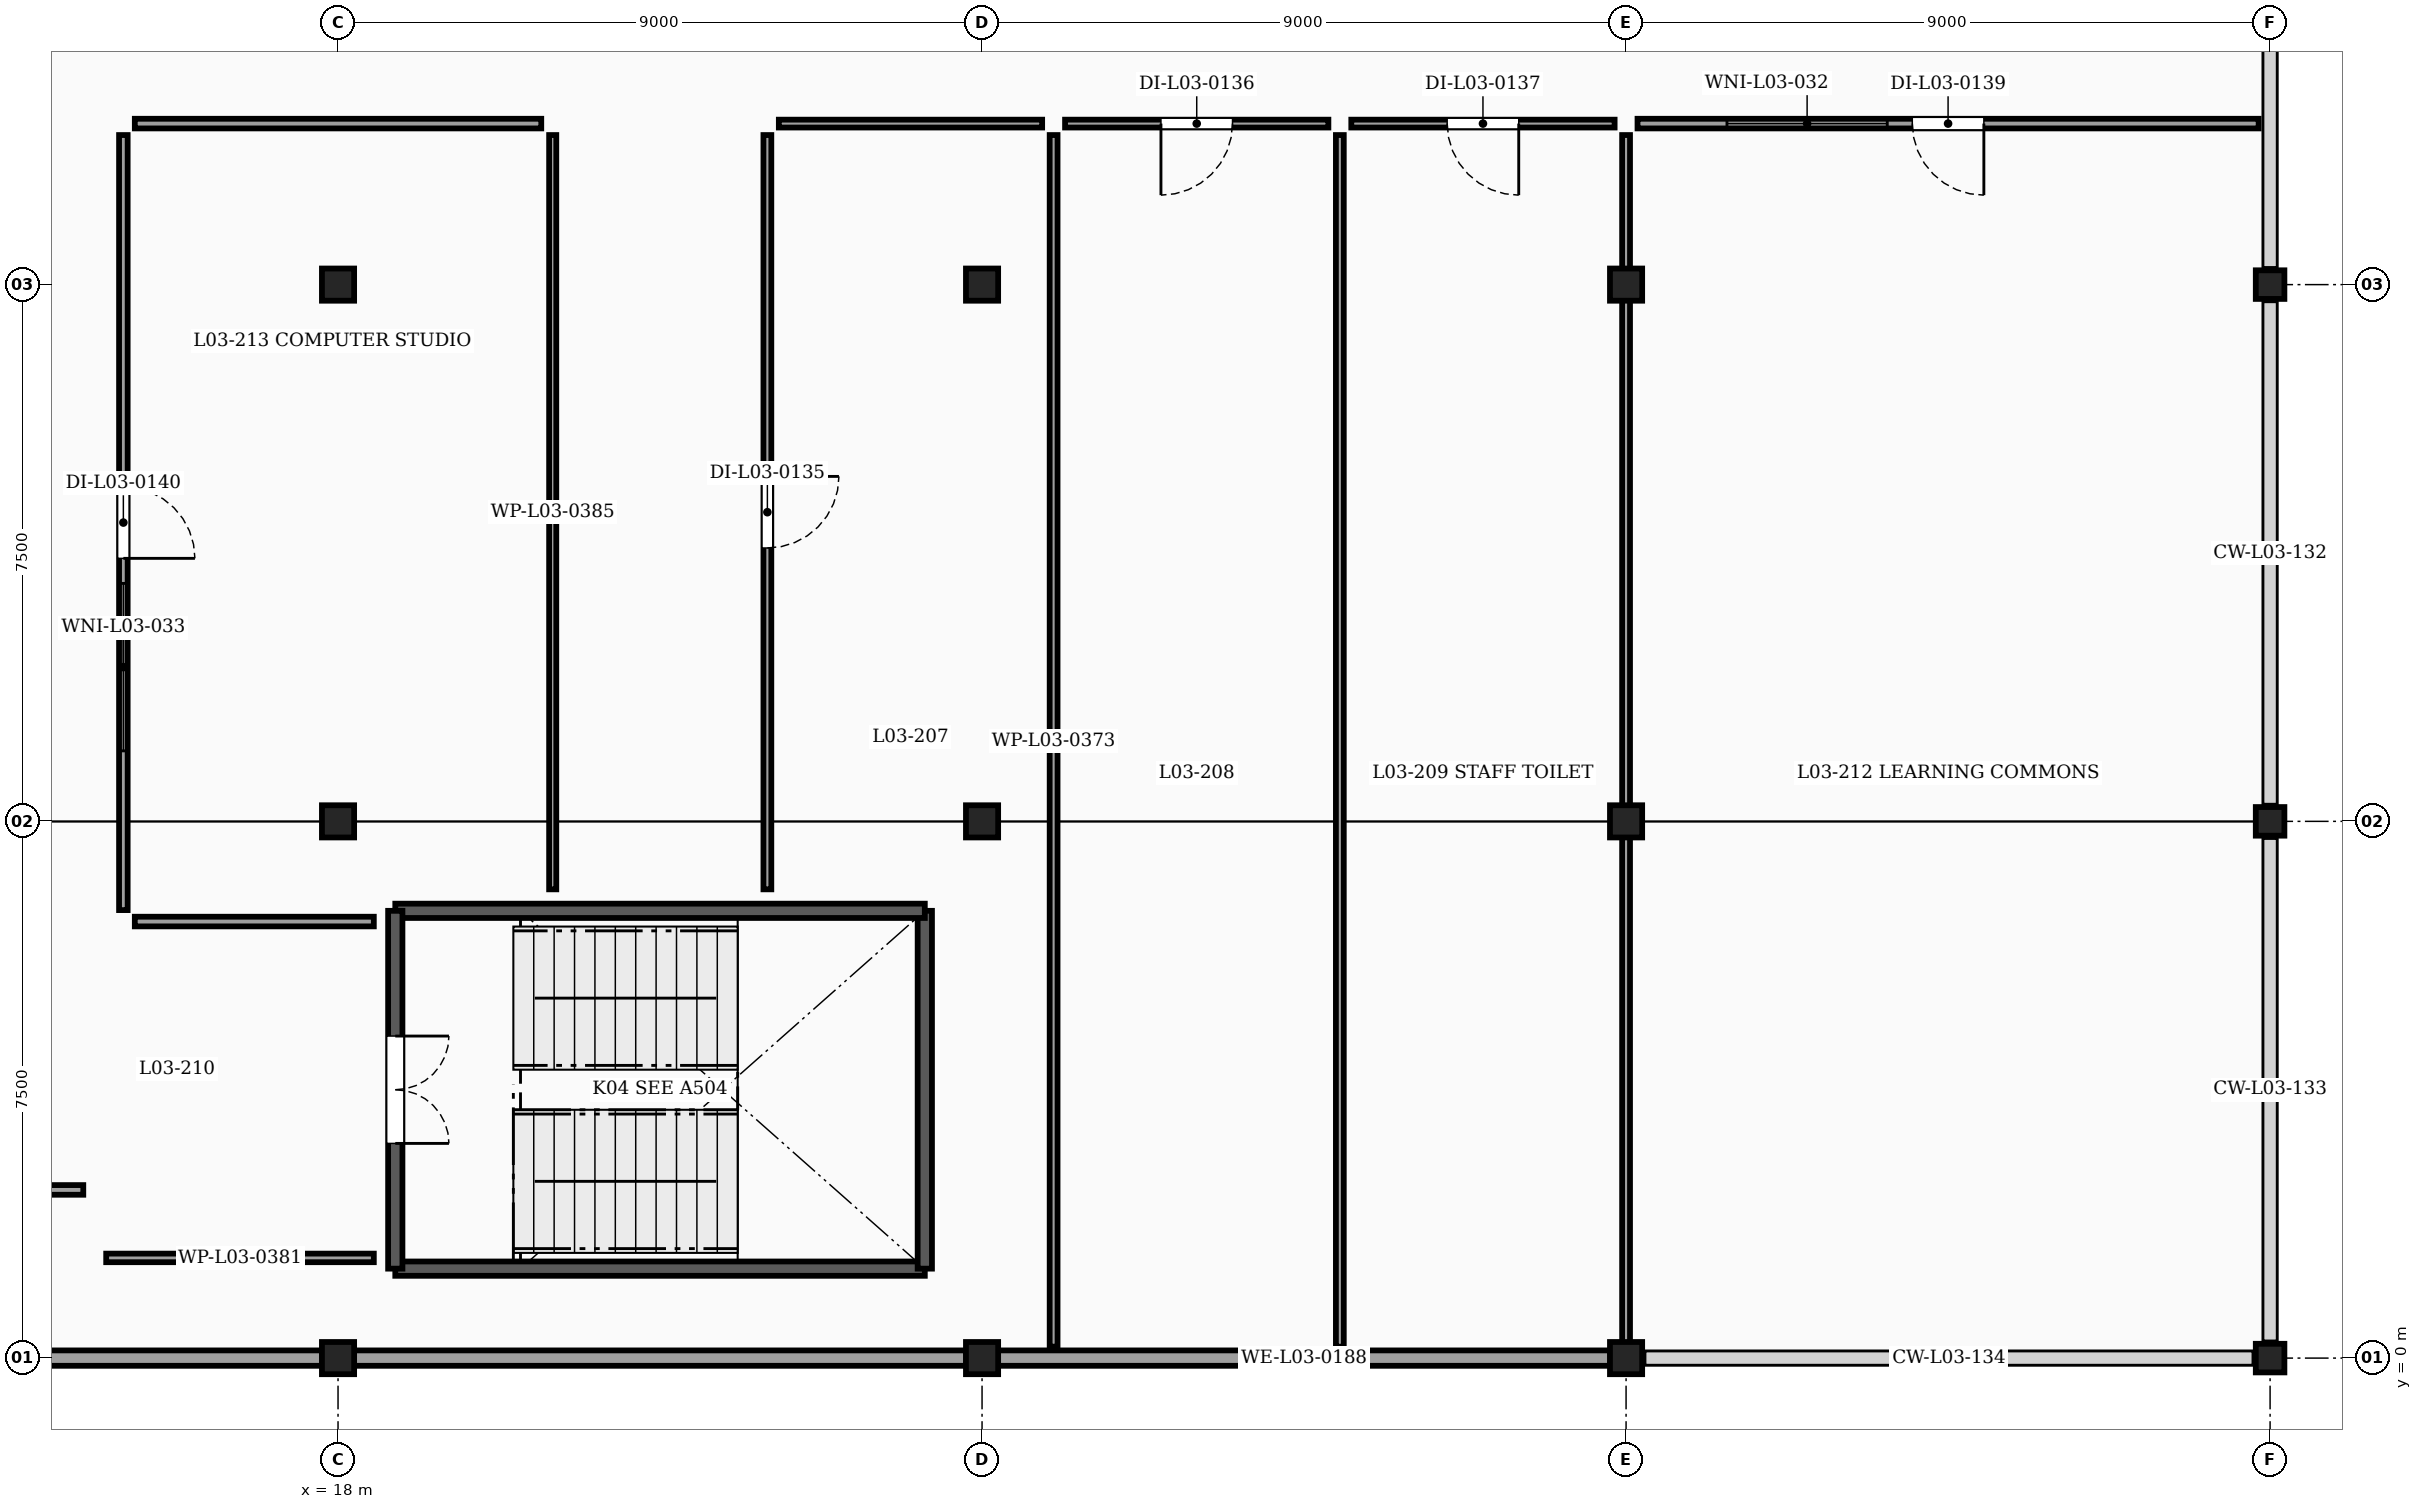
"""IFC4 building model, lengths in metres.
Left out: names, types, materials, properties, quantities, classifications, styles, units other than length and angle.
Written with IfcOpenShell. Run it as: python <this file> out.ifc"""

import sys

from ifc_helpers import new_model, si_unit, direction, frame, frame_2d, origin, origin_2d, place, context, subcontext, project, spatial, rectangle, extrude, element, fill, save


model = new_model("IFC4")
c1 = context("Model", 3, precision=1e-05, world=origin(), true_north=direction((0.0, 1.0)))
c2 = subcontext(c1, "Body", "Model", "MODEL_VIEW")
j1 = project(units=[si_unit("LENGTHUNIT", "METRE"), si_unit("PLANEANGLEUNIT", "RADIAN")], contexts=[c1])
p1 = place(None, origin())
s1 = spatial("IfcSite", under=j1, at=p1, CompositionType="ELEMENT")
p2 = place(p1, origin())
s2 = spatial("IfcBuilding", under=s1, at=p2, CompositionType="ELEMENT")
p3 = place(p2, frame((0.0, 0.0, 12.3)))
s3 = spatial("IfcBuildingStorey", under=s2, at=p3, CompositionType="ELEMENT", Elevation=12.3)
for number, where, z_axis, x_axis in (
    (1, (18.0, 0.0, 0.0), (0.0, 0.0, 1.0), (1.0, 0.0, 0.0)),
    (2, (27.0, 0.0, 0.0), (0.0, 0.0, 1.0), (1.0, 0.0, 0.0)),
    (3, (36.0, 0.0, 0.0), (0.0, 0.0, 1.0), (1.0, 0.0, 0.0)),
):
    element("IfcColumn", number, at=place(p3, frame(where, z_axis=z_axis, x_axis=x_axis)), inside=s3, PredefinedType="COLUMN", context=c2, shape_type="SweptSolid", body=[
        extrude(rectangle(XDim=0.45, YDim=0.45, at=origin_2d()), origin(), (0.0, 0.0, 1.0), 3.8),
    ])
p4 = place(p3, frame((45.0, 0.0, 0.0), z_axis=(0.0, 0.0, 1.0), x_axis=(1.0, 0.0, 0.0)))
e4 = element("IfcColumn", 4, at=p4, inside=s3, PredefinedType="COLUMN", context=c2, shape_type="SweptSolid", body=[
    extrude(rectangle(XDim=0.4, YDim=0.4, at=origin_2d()), origin(), (0.0, 0.0, 1.0), 3.8),
])
for number, where, z_axis, x_axis in (
    (5, (18.0, 7.5, 0.0), (0.0, 0.0, 1.0), (1.0, 0.0, 0.0)),
    (6, (27.0, 7.5, 0.0), (0.0, 0.0, 1.0), (1.0, 0.0, 0.0)),
    (7, (36.0, 7.5, 0.0), (0.0, 0.0, 1.0), (1.0, 0.0, 0.0)),
):
    element("IfcColumn", number, at=place(p3, frame(where, z_axis=z_axis, x_axis=x_axis)), inside=s3, PredefinedType="COLUMN", context=c2, shape_type="SweptSolid", body=[
        extrude(rectangle(XDim=0.45, YDim=0.45, at=origin_2d()), origin(), (0.0, 0.0, 1.0), 3.8),
    ])
p5 = place(p3, frame((45.0, 7.5, 0.0), z_axis=(0.0, 0.0, 1.0), x_axis=(1.0, 0.0, 0.0)))
e8 = element("IfcColumn", 8, at=p5, inside=s3, PredefinedType="COLUMN", context=c2, shape_type="SweptSolid", body=[
    extrude(rectangle(XDim=0.4, YDim=0.4, at=origin_2d()), origin(), (0.0, 0.0, 1.0), 3.8),
])
for number, where, z_axis, x_axis in (
    (9, (18.0, 15.0, 0.0), (0.0, 0.0, 1.0), (1.0, 0.0, 0.0)),
    (10, (27.0, 15.0, 0.0), (0.0, 0.0, 1.0), (1.0, 0.0, 0.0)),
    (11, (36.0, 15.0, 0.0), (0.0, 0.0, 1.0), (1.0, 0.0, 0.0)),
):
    element("IfcColumn", number, at=place(p3, frame(where, z_axis=z_axis, x_axis=x_axis)), inside=s3, PredefinedType="COLUMN", context=c2, shape_type="SweptSolid", body=[
        extrude(rectangle(XDim=0.45, YDim=0.45, at=origin_2d()), origin(), (0.0, 0.0, 1.0), 3.8),
    ])
p6 = place(p3, frame((45.0, 15.0, 0.0), z_axis=(0.0, 0.0, 1.0), x_axis=(1.0, 0.0, 0.0)))
e12 = element("IfcColumn", 12, at=p6, inside=s3, PredefinedType="COLUMN", context=c2, shape_type="SweptSolid", body=[
    extrude(rectangle(XDim=0.4, YDim=0.4, at=origin_2d()), origin(), (0.0, 0.0, 1.0), 3.8),
])
for number, where, z_axis, x_axis in (
    (13, (35.779, 0.0, 0.0), (0.0, 0.0, 1.0), (-1.0, 0.0, 0.0)),
    (14, (26.779, 0.0, 0.0), (0.0, 0.0, 1.0), (-1.0, 0.0, 0.0)),
    (15, (17.779, 0.0, 0.0), (0.0, 0.0, 1.0), (-1.0, 0.0, 0.0)),
):
    element("IfcWall", number, at=place(p3, frame(where, z_axis=z_axis, x_axis=x_axis)), inside=s3, PredefinedType="SOLIDWALL", context=c2, shape_type="SweptSolid", body=[
        extrude(rectangle(XDim=8.558, YDim=0.215, at=frame_2d((4.279, 0.0))), origin(), (0.0, 0.0, 1.0), 2.997),
    ])
p7 = place(p3, frame((18.8, 1.25, 0.0), z_axis=(0.0, 0.0, 1.0), x_axis=(1.0, 0.0, 0.0)))
e16 = element("IfcWall", 16, at=p7, inside=s3, PredefinedType="SHEAR", context=c2, shape_type="SweptSolid", body=[
    extrude(rectangle(XDim=7.4, YDim=0.2, at=frame_2d((3.7, 0.0))), origin(), (0.0, 0.0, 1.0), 3.59),
])
p8 = place(p3, frame((26.2, 1.25, 0.0), z_axis=(0.0, 0.0, 1.0), x_axis=(0.0, 1.0, 0.0)))
e17 = element("IfcWall", 17, at=p8, inside=s3, PredefinedType="SHEAR", context=c2, shape_type="SweptSolid", body=[
    extrude(rectangle(XDim=5.0, YDim=0.2, at=frame_2d((2.5, 0.0))), origin(), (0.0, 0.0, 1.0), 3.59),
])
p9 = place(p3, frame((26.2, 6.25, 0.0), z_axis=(0.0, 0.0, 1.0), x_axis=(-1.0, 0.0, 0.0)))
e18 = element("IfcWall", 18, at=p9, inside=s3, PredefinedType="SHEAR", context=c2, shape_type="SweptSolid", body=[
    extrude(rectangle(XDim=7.4, YDim=0.2, at=frame_2d((3.7, 0.0))), origin(), (0.0, 0.0, 1.0), 3.59),
])
p10 = place(p3, frame((18.8, 6.25, 0.0), z_axis=(0.0, 0.0, 1.0), x_axis=(0.0, -1.0, 0.0)))
e19 = element("IfcWall", 19, at=p10, inside=s3, PredefinedType="SHEAR", context=c2, shape_type="SweptSolid", body=[
    extrude(rectangle(XDim=5.0, YDim=0.2, at=frame_2d((2.5, 0.0))), origin(), (0.0, 0.0, 1.0), 3.59),
])
p11 = place(p10, frame((1.75, 0.0, 0.0)))
e20 = element("IfcOpeningElement", 20, at=p11, cuts=e19, PredefinedType="OPENING", context=c2, shape_type="SweptSolid", body=[
    extrude(rectangle(XDim=1.5, YDim=2.15, at=frame_2d((0.75, 1.075))), frame((0.0, 0.11, 0.0), z_axis=(0.0, -1.0, 0.0), x_axis=(1.0, 0.0, 0.0)), (0.0, 0.0, 1.0), 0.22),
])
p12 = place(p3, frame((28.0, 0.16, 0.0), z_axis=(0.0, 0.0, 1.0), x_axis=(0.0, 1.0, 0.0)))
e21 = element("IfcWall", 21, at=p12, inside=s3, PredefinedType="PARTITIONING", context=c2, shape_type="SweptSolid", body=[
    extrude(rectangle(XDim=16.93, YDim=0.11, at=frame_2d((8.465, 0.0))), origin(), (0.0, 0.0, 1.0), 3.59),
])
p13 = place(p3, frame((24.0, 17.09, 0.0), z_axis=(0.0, 0.0, 1.0), x_axis=(0.0, -1.0, 0.0)))
e22 = element("IfcWall", 22, at=p13, inside=s3, PredefinedType="PARTITIONING", context=c2, shape_type="SweptSolid", body=[
    extrude(rectangle(XDim=10.54, YDim=0.11, at=frame_2d((5.27, 0.0))), origin(), (0.0, 0.0, 1.0), 3.222),
])
p14 = place(p13, frame((4.77, 0.0, 0.0)))
e23 = element("IfcOpeningElement", 23, at=p14, cuts=e22, PredefinedType="OPENING", context=c2, shape_type="SweptSolid", body=[
    extrude(rectangle(XDim=1.0, YDim=2.15, at=frame_2d((0.5, 1.075))), frame((0.0, 0.065, 0.0), z_axis=(0.0, -1.0, 0.0), x_axis=(1.0, 0.0, 0.0)), (0.0, 0.0, 1.0), 0.13),
])
p15 = place(p3, frame((27.84, 17.25, 0.0), z_axis=(0.0, 0.0, 1.0), x_axis=(-1.0, 0.0, 0.0)))
e24 = element("IfcWall", 24, at=p15, inside=s3, PredefinedType="PARTITIONING", context=c2, shape_type="SweptSolid", body=[
    extrude(rectangle(XDim=3.68, YDim=0.11, at=frame_2d((1.84, 0.0))), origin(), (0.0, 0.0, 1.0), 3.59),
])
p16 = place(p3, frame((32.0, 0.16, 0.0), z_axis=(0.0, 0.0, 1.0), x_axis=(0.0, 1.0, 0.0)))
e25 = element("IfcWall", 25, at=p16, inside=s3, PredefinedType="PARTITIONING", context=c2, shape_type="SweptSolid", body=[
    extrude(rectangle(XDim=16.93, YDim=0.11, at=frame_2d((8.465, 0.0))), origin(), (0.0, 0.0, 1.0), 3.59),
])
p17 = place(p3, frame((31.84, 17.25, 0.0), z_axis=(0.0, 0.0, 1.0), x_axis=(-1.0, 0.0, 0.0)))
e26 = element("IfcWall", 26, at=p17, inside=s3, PredefinedType="PARTITIONING", context=c2, shape_type="SweptSolid", body=[
    extrude(rectangle(XDim=3.68, YDim=0.11, at=frame_2d((1.84, 0.0))), origin(), (0.0, 0.0, 1.0), 3.59),
])
p18 = place(p17, frame((1.34, 0.0, 0.0)))
e27 = element("IfcOpeningElement", 27, at=p18, cuts=e26, PredefinedType="OPENING", context=c2, shape_type="SweptSolid", body=[
    extrude(rectangle(XDim=1.0, YDim=2.15, at=frame_2d((0.5, 1.075))), frame((0.0, 0.065, 0.0), z_axis=(0.0, -1.0, 0.0), x_axis=(1.0, 0.0, 0.0)), (0.0, 0.0, 1.0), 0.13),
])
p19 = place(p3, frame((35.84, 17.25, 0.0), z_axis=(0.0, 0.0, 1.0), x_axis=(-1.0, 0.0, 0.0)))
e28 = element("IfcWall", 28, at=p19, inside=s3, PredefinedType="PARTITIONING", context=c2, shape_type="SweptSolid", body=[
    extrude(rectangle(XDim=3.68, YDim=0.11, at=frame_2d((1.84, 0.0))), origin(), (0.0, 0.0, 1.0), 3.59),
])
p20 = place(p19, frame((1.34, 0.0, 0.0)))
e29 = element("IfcOpeningElement", 29, at=p20, cuts=e28, PredefinedType="OPENING", context=c2, shape_type="SweptSolid", body=[
    extrude(rectangle(XDim=1.0, YDim=2.15, at=frame_2d((0.5, 1.075))), frame((0.0, 0.065, 0.0), z_axis=(0.0, -1.0, 0.0), x_axis=(1.0, 0.0, 0.0)), (0.0, 0.0, 1.0), 0.13),
])
p21 = place(p3, frame((36.0, 0.16, 0.0), z_axis=(0.0, 0.0, 1.0), x_axis=(0.0, 1.0, 0.0)))
e30 = element("IfcWall", 30, at=p21, inside=s3, PredefinedType="PARTITIONING", context=c2, shape_type="SweptSolid", body=[
    extrude(rectangle(XDim=16.93, YDim=0.11, at=frame_2d((8.465, 0.0))), origin(), (0.0, 0.0, 1.0), 2.997),
])
p22 = place(p3, frame((18.5, 1.4, 0.0), z_axis=(0.0, 0.0, 1.0), x_axis=(-1.0, 0.0, 0.0)))
e31 = element("IfcWall", 31, at=p22, inside=s3, PredefinedType="PARTITIONING", context=c2, shape_type="SweptSolid", body=[
    extrude(rectangle(XDim=3.74, YDim=0.12, at=frame_2d((1.87, 0.0))), origin(), (0.0, 0.0, 1.0), 3.59),
])
p23 = place(p3, frame((14.44, 2.35, 0.0), z_axis=(0.0, 0.0, 1.0), x_axis=(-1.0, 0.0, 0.0)))
e32 = element("IfcWall", 32, at=p23, inside=s3, PredefinedType="PARTITIONING", context=c2, shape_type="SweptSolid", body=[
    extrude(rectangle(XDim=2.18, YDim=0.135, at=frame_2d((1.09, 0.0))), origin(), (0.0, 0.0, 1.0), 3.59),
])
p24 = place(p3, frame((44.84, 17.25, 0.0), z_axis=(0.0, 0.0, 1.0), x_axis=(-1.0, 0.0, 0.0)))
e33 = element("IfcWall", 33, at=p24, inside=s3, PredefinedType="PARTITIONING", context=c2, shape_type="SweptSolid", body=[
    extrude(rectangle(XDim=8.68, YDim=0.135, at=frame_2d((4.34, 0.0))), origin(), (0.0, 0.0, 1.0), 3.59),
])
p25 = place(p24, frame((3.84, 0.0, 0.0)))
e34 = element("IfcOpeningElement", 34, at=p25, cuts=e33, PredefinedType="OPENING", context=c2, shape_type="SweptSolid", body=[
    extrude(rectangle(XDim=1.0, YDim=2.15, at=frame_2d((0.5, 1.075))), frame((0.0, 0.077, 0.0), z_axis=(0.0, -1.0, 0.0), x_axis=(1.0, 0.0, 0.0)), (0.0, 0.0, 1.0), 0.155),
])
p26 = place(p24, frame((5.19, 0.0, 1.02)))
e35 = element("IfcOpeningElement", 35, at=p26, cuts=e33, PredefinedType="OPENING", context=c2, shape_type="SweptSolid", body=[
    extrude(rectangle(XDim=2.24, YDim=1.2, at=frame_2d((1.12, 0.6))), frame((0.0, 0.077, 0.0), z_axis=(0.0, -1.0, 0.0), x_axis=(1.0, 0.0, 0.0)), (0.0, 0.0, 1.0), 0.155),
])
p27 = place(p3, frame((21.0, 6.55, 0.0), z_axis=(0.0, 0.0, 1.0), x_axis=(0.0, 1.0, 0.0)))
e36 = element("IfcWall", 36, at=p27, inside=s3, PredefinedType="PARTITIONING", context=c2, shape_type="SweptSolid", body=[
    extrude(rectangle(XDim=10.54, YDim=0.1, at=frame_2d((5.27, 0.0))), origin(), (0.0, 0.0, 1.0), 3.222),
])
p28 = place(p3, frame((20.84, 17.25, 0.0), z_axis=(0.0, 0.0, 1.0), x_axis=(-1.0, 0.0, 0.0)))
e37 = element("IfcWall", 37, at=p28, inside=s3, PredefinedType="PARTITIONING", context=c2, shape_type="SweptSolid", body=[
    extrude(rectangle(XDim=5.68, YDim=0.135, at=frame_2d((2.84, 0.0))), origin(), (0.0, 0.0, 1.0), 3.59),
])
p29 = place(p3, frame((15.0, 17.09, 0.0), z_axis=(0.0, 0.0, 1.0), x_axis=(0.0, -1.0, 0.0)))
e38 = element("IfcWall", 38, at=p29, inside=s3, PredefinedType="PARTITIONING", context=c2, shape_type="SweptSolid", body=[
    extrude(rectangle(XDim=10.83, YDim=0.12, at=frame_2d((5.415, 0.0))), origin(), (0.0, 0.0, 1.0), 3.222),
])
p30 = place(p29, frame((4.915, 0.0, 0.0)))
e39 = element("IfcOpeningElement", 39, at=p30, cuts=e38, PredefinedType="OPENING", context=c2, shape_type="SweptSolid", body=[
    extrude(rectangle(XDim=1.0, YDim=2.15, at=frame_2d((0.5, 1.075))), frame((0.0, 0.07, 0.0), z_axis=(0.0, -1.0, 0.0), x_axis=(1.0, 0.0, 0.0)), (0.0, 0.0, 1.0), 0.14),
])
p31 = place(p29, frame((6.265, 0.0, 1.02)))
e40 = element("IfcOpeningElement", 40, at=p31, cuts=e38, PredefinedType="OPENING", context=c2, shape_type="SweptSolid", body=[
    extrude(rectangle(XDim=2.34, YDim=1.18, at=frame_2d((1.17, 0.59))), frame((0.0, 0.07, 0.0), z_axis=(0.0, -1.0, 0.0), x_axis=(1.0, 0.0, 0.0)), (0.0, 0.0, 1.0), 0.14),
])
p32 = place(p3, frame((15.16, 6.1, 0.0), z_axis=(0.0, 0.0, 1.0), x_axis=(1.0, 0.0, 0.0)))
e41 = element("IfcWall", 41, at=p32, inside=s3, PredefinedType="PARTITIONING", context=c2, shape_type="SweptSolid", body=[
    extrude(rectangle(XDim=3.34, YDim=0.135, at=frame_2d((1.67, 0.0))), origin(), (0.0, 0.0, 1.0), 3.59),
])
p33 = place(p11, origin())
e42 = element("IfcDoor", 42, at=p33, inside=s3, OperationType="DOUBLE_DOOR_SINGLE_SWING", PredefinedType="DOOR", context=c2, shape_type="SweptSolid", body=[
    extrude(rectangle(XDim=1.5, YDim=2.15, at=frame_2d((0.75, 1.075))), frame((0.0, 0.025, 0.0), z_axis=(0.0, -1.0, 0.0), x_axis=(1.0, 0.0, 0.0)), (0.0, 0.0, 1.0), 0.05),
])
fill(e20, e42)
p34 = place(p14, origin())
e43 = element("IfcDoor", 43, at=p34, inside=s3, OperationType="SINGLE_SWING_LEFT", PredefinedType="DOOR", context=c2, shape_type="SweptSolid", body=[
    extrude(rectangle(XDim=1.0, YDim=2.15, at=frame_2d((0.5, 1.075))), frame((0.0, 0.025, 0.0), z_axis=(0.0, -1.0, 0.0), x_axis=(1.0, 0.0, 0.0)), (0.0, 0.0, 1.0), 0.05),
])
fill(e23, e43)
p35 = place(p18, origin())
e44 = element("IfcDoor", 44, at=p35, inside=s3, OperationType="SINGLE_SWING_RIGHT", PredefinedType="DOOR", context=c2, shape_type="SweptSolid", body=[
    extrude(rectangle(XDim=1.0, YDim=2.15, at=frame_2d((0.5, 1.075))), frame((0.0, 0.025, 0.0), z_axis=(0.0, -1.0, 0.0), x_axis=(1.0, 0.0, 0.0)), (0.0, 0.0, 1.0), 0.05),
])
fill(e27, e44)
p36 = place(p20, origin())
e45 = element("IfcDoor", 45, at=p36, inside=s3, OperationType="SINGLE_SWING_LEFT", PredefinedType="DOOR", context=c2, shape_type="SweptSolid", body=[
    extrude(rectangle(XDim=1.0, YDim=2.15, at=frame_2d((0.5, 1.075))), frame((0.0, 0.025, 0.0), z_axis=(0.0, -1.0, 0.0), x_axis=(1.0, 0.0, 0.0)), (0.0, 0.0, 1.0), 0.05),
])
fill(e29, e45)
p37 = place(p25, origin())
e46 = element("IfcDoor", 46, at=p37, inside=s3, OperationType="SINGLE_SWING_LEFT", PredefinedType="DOOR", context=c2, shape_type="SweptSolid", body=[
    extrude(rectangle(XDim=1.0, YDim=2.15, at=frame_2d((0.5, 1.075))), frame((0.0, 0.025, 0.0), z_axis=(0.0, -1.0, 0.0), x_axis=(1.0, 0.0, 0.0)), (0.0, 0.0, 1.0), 0.05),
])
fill(e34, e46)
p38 = place(p26, origin())
e47 = element("IfcWindow", 47, at=p38, inside=s3, PartitioningType="DOUBLE_PANEL_VERTICAL", PredefinedType="WINDOW", context=c2, shape_type="SweptSolid", body=[
    extrude(rectangle(XDim=2.24, YDim=1.2, at=frame_2d((1.12, 0.6))), frame((0.0, 0.03, 0.0), z_axis=(0.0, -1.0, 0.0), x_axis=(1.0, 0.0, 0.0)), (0.0, 0.0, 1.0), 0.06),
])
fill(e35, e47)
p39 = place(p30, origin())
e48 = element("IfcDoor", 48, at=p39, inside=s3, OperationType="SINGLE_SWING_RIGHT", PredefinedType="DOOR", context=c2, shape_type="SweptSolid", body=[
    extrude(rectangle(XDim=1.0, YDim=2.15, at=frame_2d((0.5, 1.075))), frame((0.0, 0.025, 0.0), z_axis=(0.0, -1.0, 0.0), x_axis=(1.0, 0.0, 0.0)), (0.0, 0.0, 1.0), 0.05),
])
fill(e39, e48)
p40 = place(p31, origin())
e49 = element("IfcWindow", 49, at=p40, inside=s3, PartitioningType="DOUBLE_PANEL_VERTICAL", PredefinedType="WINDOW", context=c2, shape_type="SweptSolid", body=[
    extrude(rectangle(XDim=2.34, YDim=1.18, at=frame_2d((1.17, 0.59))), frame((0.0, 0.03, 0.0), z_axis=(0.0, -1.0, 0.0), x_axis=(1.0, 0.0, 0.0)), (0.0, 0.0, 1.0), 0.06),
])
fill(e40, e49)
save(model, sys.argv[1])
